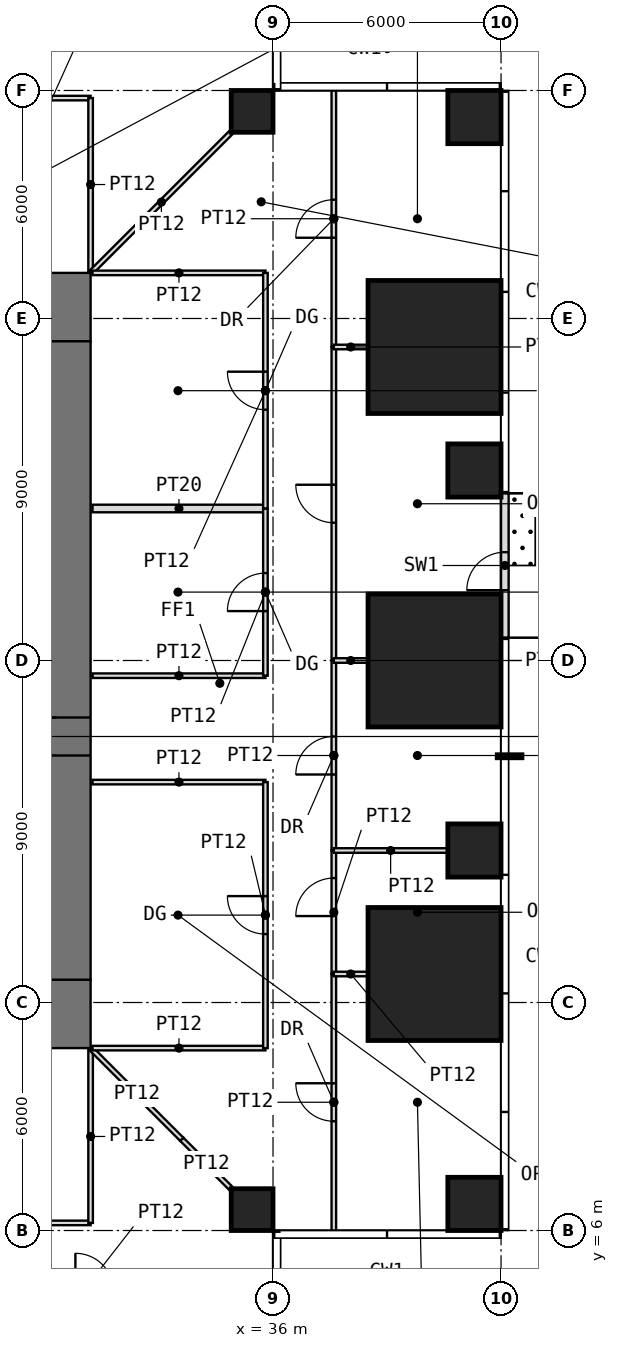
"""IFC4 building model, lengths in metres.
Left out: names, types, materials, properties, quantities, classifications, styles, units other than length and angle.
Written with IfcOpenShell. Run it as: python <this file> out.ifc"""

import sys

from ifc_helpers import new_model, si_unit, direction, frame, frame_2d, origin, origin_2d, place, context, subcontext, project, spatial, rectangle, extrude, element, fill, save


model = new_model("IFC4")
c1 = context("Model", 3, precision=1e-05, world=origin(), true_north=direction((0.0, 1.0)))
c2 = subcontext(c1, "Body", "Model", "MODEL_VIEW")
j1 = project(units=[si_unit("LENGTHUNIT", "METRE"), si_unit("PLANEANGLEUNIT", "RADIAN")], contexts=[c1])
p1 = place(None, origin())
s1 = spatial("IfcSite", under=j1, at=p1, CompositionType="ELEMENT")
p2 = place(p1, origin())
s2 = spatial("IfcBuilding", under=s1, at=p2, CompositionType="ELEMENT")
p3 = place(p2, frame((0.0, 0.0, 78.5)))
s3 = spatial("IfcBuildingStorey", under=s2, at=p3, CompositionType="ELEMENT", Elevation=78.5)
p4 = place(p3, frame((35.45, 6.55, 0.0), z_axis=(0.0, 0.0, 1.0), x_axis=(1.0, 0.0, 0.0)))
e1 = element("IfcColumn", 1, at=p4, inside=s3, PredefinedType="COLUMN", context=c2, shape_type="SweptSolid", body=[
    extrude(rectangle(XDim=1.1, YDim=1.1, at=origin_2d()), origin(), (0.0, 0.0, 1.0), 4.0),
])
p5 = place(p3, frame((41.3, 6.7, 0.0), z_axis=(0.0, 0.0, 1.0), x_axis=(1.0, 0.0, 0.0)))
e2 = element("IfcColumn", 2, at=p5, inside=s3, PredefinedType="COLUMN", context=c2, shape_type="SweptSolid", body=[
    extrude(rectangle(XDim=1.4, YDim=1.4, at=origin_2d()), origin(), (0.0, 0.0, 1.0), 4.0),
])
p6 = place(p3, frame((40.25, 12.75, 0.0), z_axis=(0.0, 0.0, 1.0), x_axis=(1.0, 0.0, 0.0)))
e3 = element("IfcColumn", 3, at=p6, inside=s3, PredefinedType="COLUMN", context=c2, shape_type="SweptSolid", body=[
    extrude(rectangle(XDim=3.5, YDim=3.5, at=origin_2d()), origin(), (0.0, 0.0, 1.0), 4.0),
])
p7 = place(p3, frame((41.3, 16.0, 0.0), z_axis=(0.0, 0.0, 1.0), x_axis=(1.0, 0.0, 0.0)))
e4 = element("IfcColumn", 4, at=p7, inside=s3, PredefinedType="COLUMN", context=c2, shape_type="SweptSolid", body=[
    extrude(rectangle(XDim=1.4, YDim=1.4, at=origin_2d()), origin(), (0.0, 0.0, 1.0), 4.0),
])
p8 = place(p3, frame((40.25, 21.0, 0.0), z_axis=(0.0, 0.0, 1.0), x_axis=(1.0, 0.0, 0.0)))
e5 = element("IfcColumn", 5, at=p8, inside=s3, PredefinedType="COLUMN", context=c2, shape_type="SweptSolid", body=[
    extrude(rectangle(XDim=3.5, YDim=3.5, at=origin_2d()), origin(), (0.0, 0.0, 1.0), 4.0),
])
p9 = place(p3, frame((41.3, 26.0, 0.0), z_axis=(0.0, 0.0, 1.0), x_axis=(1.0, 0.0, 0.0)))
e6 = element("IfcColumn", 6, at=p9, inside=s3, PredefinedType="COLUMN", context=c2, shape_type="SweptSolid", body=[
    extrude(rectangle(XDim=1.4, YDim=1.4, at=origin_2d()), origin(), (0.0, 0.0, 1.0), 4.0),
])
p10 = place(p3, frame((40.25, 29.25, 0.0), z_axis=(0.0, 0.0, 1.0), x_axis=(1.0, 0.0, 0.0)))
e7 = element("IfcColumn", 7, at=p10, inside=s3, PredefinedType="COLUMN", context=c2, shape_type="SweptSolid", body=[
    extrude(rectangle(XDim=3.5, YDim=3.5, at=origin_2d()), origin(), (0.0, 0.0, 1.0), 4.0),
])
p11 = place(p3, frame((35.45, 35.45, 0.0), z_axis=(0.0, 0.0, 1.0), x_axis=(1.0, 0.0, 0.0)))
e8 = element("IfcColumn", 8, at=p11, inside=s3, PredefinedType="COLUMN", context=c2, shape_type="SweptSolid", body=[
    extrude(rectangle(XDim=1.1, YDim=1.1, at=origin_2d()), origin(), (0.0, 0.0, 1.0), 4.0),
])
p12 = place(p3, frame((41.3, 35.3, 0.0), z_axis=(0.0, 0.0, 1.0), x_axis=(1.0, 0.0, 0.0)))
e9 = element("IfcColumn", 9, at=p12, inside=s3, PredefinedType="COLUMN", context=c2, shape_type="SweptSolid", body=[
    extrude(rectangle(XDim=1.4, YDim=1.4, at=origin_2d()), origin(), (0.0, 0.0, 1.0), 4.0),
])
p13 = place(p3, frame((42.1, 21.6, 0.0), z_axis=(0.0, 0.0, 1.0), x_axis=(0.0, 1.0, 0.0)))
e10 = element("IfcWall", 10, at=p13, inside=s3, PredefinedType="USERDEFINED", context=c2, shape_type="SweptSolid", body=[
    extrude(rectangle(XDim=3.8, YDim=0.2, at=frame_2d((1.9, 0.0))), origin(), (0.0, 0.0, 1.0), 3.75),
])
p14 = place(p13, frame((1.25, 0.0, 0.0)))
e11 = element("IfcOpeningElement", 11, at=p14, cuts=e10, PredefinedType="OPENING", context=c2, shape_type="SweptSolid", body=[
    extrude(rectangle(XDim=1.0, YDim=2.4, at=frame_2d((0.5, 1.2))), frame((0.0, 0.11, 0.0), z_axis=(0.0, -1.0, 0.0), x_axis=(1.0, 0.0, 0.0)), (0.0, 0.0, 1.0), 0.22),
])
p15 = place(p3, frame((10.8, 11.7, -0.05), z_axis=(0.0, 0.0, 1.0), x_axis=(1.0, 0.0, 0.0)))
e12 = element("IfcWall", 12, at=p15, inside=s3, PredefinedType="SHEAR", context=c2, shape_type="SweptSolid", body=[
    extrude(rectangle(XDim=20.4, YDim=1.8, at=frame_2d((10.2, 0.0))), origin(), (0.0, 0.0, 1.0), 4.0),
])
p16 = place(p15, frame((9.2, 0.0, 0.05)))
e13 = element("IfcOpeningElement", 13, at=p16, cuts=e12, PredefinedType="OPENING", context=c2, shape_type="SweptSolid", body=[
    extrude(rectangle(XDim=2.0, YDim=2.2, at=frame_2d((1.0, 1.1))), frame((0.0, 0.91, 0.0), z_axis=(0.0, -1.0, 0.0), x_axis=(1.0, 0.0, 0.0)), (0.0, 0.0, 1.0), 1.82),
])
p17 = place(p3, frame((10.8, 30.3, -0.05), z_axis=(0.0, 0.0, 1.0), x_axis=(1.0, 0.0, 0.0)))
e14 = element("IfcWall", 14, at=p17, inside=s3, PredefinedType="SHEAR", context=c2, shape_type="SweptSolid", body=[
    extrude(rectangle(XDim=20.4, YDim=1.8, at=frame_2d((10.2, 0.0))), origin(), (0.0, 0.0, 1.0), 4.0),
])
p18 = place(p17, frame((9.2, 0.0, 0.05)))
e15 = element("IfcOpeningElement", 15, at=p18, cuts=e14, PredefinedType="OPENING", context=c2, shape_type="SweptSolid", body=[
    extrude(rectangle(XDim=2.0, YDim=2.2, at=frame_2d((1.0, 1.1))), frame((0.0, 0.91, 0.0), z_axis=(0.0, -1.0, 0.0), x_axis=(1.0, 0.0, 0.0)), (0.0, 0.0, 1.0), 1.82),
])
p19 = place(p3, frame((30.3, 12.6, -0.05), z_axis=(0.0, 0.0, 1.0), x_axis=(0.0, 1.0, 0.0)))
e16 = element("IfcWall", 16, at=p19, inside=s3, PredefinedType="SHEAR", context=c2, shape_type="SweptSolid", body=[
    extrude(rectangle(XDim=16.8, YDim=1.8, at=frame_2d((8.4, 0.0))), origin(), (0.0, 0.0, 1.0), 4.0),
])
p20 = place(p19, frame((5.9, 0.0, 0.05)))
e17 = element("IfcOpeningElement", 17, at=p20, cuts=e16, PredefinedType="OPENING", context=c2, shape_type="SweptSolid", body=[
    extrude(rectangle(XDim=1.0, YDim=2.2, at=frame_2d((0.5, 1.1))), frame((0.0, 0.91, 0.0), z_axis=(0.0, -1.0, 0.0), x_axis=(1.0, 0.0, 0.0)), (0.0, 0.0, 1.0), 1.82),
])
p21 = place(p3, frame((18.6, 6.2, 0.0), z_axis=(0.0, 0.0, 1.0), x_axis=(1.0, 0.0, 0.0)))
e18 = element("IfcWall", 18, at=p21, inside=s3, PredefinedType="PARTITIONING", context=c2, shape_type="SweptSolid", body=[
    extrude(rectangle(XDim=12.6, YDim=0.12, at=frame_2d((6.3, 0.0))), origin(), (0.0, 0.0, 1.0), 3.75),
])
p22 = place(p21, frame((8.1, 0.0, 0.0)))
e19 = element("IfcOpeningElement", 19, at=p22, cuts=e18, PredefinedType="OPENING", context=c2, shape_type="SweptSolid", body=[
    extrude(rectangle(XDim=1.0, YDim=2.4, at=frame_2d((0.5, 1.2))), frame((0.0, 0.07, 0.0), z_axis=(0.0, -1.0, 0.0), x_axis=(1.0, 0.0, 0.0)), (0.0, 0.0, 1.0), 0.14),
])
p23 = place(p3, frame((27.4, 35.8, 0.0), z_axis=(0.0, 0.0, 1.0), x_axis=(1.0, 0.0, 0.0)))
e20 = element("IfcWall", 20, at=p23, inside=s3, PredefinedType="PARTITIONING", context=c2, shape_type="SweptSolid", body=[
    extrude(rectangle(XDim=3.8, YDim=0.12, at=frame_2d((1.9, 0.0))), origin(), (0.0, 0.0, 1.0), 3.75),
])
p24 = place(p23, frame((1.4, 0.0, 0.0)))
e21 = element("IfcOpeningElement", 21, at=p24, cuts=e20, PredefinedType="OPENING", context=c2, shape_type="SweptSolid", body=[
    extrude(rectangle(XDim=1.0, YDim=2.4, at=frame_2d((0.5, 1.2))), frame((0.0, 0.07, 0.0), z_axis=(0.0, -1.0, 0.0), x_axis=(1.0, 0.0, 0.0)), (0.0, 0.0, 1.0), 0.14),
])
for number, where, z_axis, x_axis in (
    (22, (31.2, 6.2, 0.0), (0.0, 0.0, 1.0), (0.0, 1.0, 0.0)),
    (23, (31.2, 31.25, 0.0), (0.0, 0.0, 1.0), (0.0, 1.0, 0.0)),
):
    element("IfcWall", number, at=place(p3, frame(where, z_axis=z_axis, x_axis=x_axis)), inside=s3, PredefinedType="PARTITIONING", context=c2, shape_type="SweptSolid", body=[
        extrude(rectangle(XDim=4.55, YDim=0.12, at=frame_2d((2.275, 0.0))), origin(), (0.0, 0.0, 1.0), 3.75),
    ])
p25 = place(p3, frame((31.235, 10.765, 0.0), z_axis=(0.0, 0.0, 1.0), x_axis=(0.707106781187, -0.707106781187, 0.0)))
e24 = element("IfcWall", 24, at=p25, inside=s3, PredefinedType="PARTITIONING", context=c2, shape_type="SweptSolid", body=[
    extrude(rectangle(XDim=3.346, YDim=0.12, at=frame_2d((1.673, 0.0))), origin(), (0.0, 0.0, 1.0), 3.75),
])
p26 = place(p3, frame((31.235, 31.235, 0.0), z_axis=(0.0, 0.0, 1.0), x_axis=(0.707106781187, 0.707106781187, 0.0)))
e25 = element("IfcWall", 25, at=p26, inside=s3, PredefinedType="PARTITIONING", context=c2, shape_type="SweptSolid", body=[
    extrude(rectangle(XDim=5.168, YDim=0.12, at=frame_2d((2.584, 0.0))), origin(), (0.0, 0.0, 1.0), 3.75),
])
for number, where, z_axis, x_axis in (
    (26, (31.25, 10.8, 0.0), (0.0, 0.0, 1.0), (1.0, 0.0, 0.0)),
    (27, (31.25, 17.8, 0.0), (0.0, 0.0, 1.0), (1.0, 0.0, 0.0)),
    (28, (31.25, 20.6, 0.0), (0.0, 0.0, 1.0), (1.0, 0.0, 0.0)),
):
    element("IfcWall", number, at=place(p3, frame(where, z_axis=z_axis, x_axis=x_axis)), inside=s3, PredefinedType="PARTITIONING", context=c2, shape_type="SweptSolid", body=[
        extrude(rectangle(XDim=4.55, YDim=0.12, at=frame_2d((2.275, 0.0))), origin(), (0.0, 0.0, 1.0), 3.75),
    ])
p27 = place(p3, frame((31.25, 25.0, 0.0), z_axis=(0.0, 0.0, 1.0), x_axis=(1.0, 0.0, 0.0)))
e29 = element("IfcWall", 29, at=p27, inside=s3, PredefinedType="PARTITIONING", context=c2, shape_type="SweptSolid", body=[
    extrude(rectangle(XDim=4.55, YDim=0.2, at=frame_2d((2.275, 0.0))), origin(), (0.0, 0.0, 1.0), 3.75),
])
p28 = place(p3, frame((31.25, 31.2, 0.0), z_axis=(0.0, 0.0, 1.0), x_axis=(1.0, 0.0, 0.0)))
e30 = element("IfcWall", 30, at=p28, inside=s3, PredefinedType="PARTITIONING", context=c2, shape_type="SweptSolid", body=[
    extrude(rectangle(XDim=4.55, YDim=0.12, at=frame_2d((2.275, 0.0))), origin(), (0.0, 0.0, 1.0), 3.75),
])
p29 = place(p3, frame((33.602, 8.398, 0.0), z_axis=(0.0, 0.0, 1.0), x_axis=(0.707106781187, -0.707106781187, 0.0)))
e31 = element("IfcWall", 31, at=p29, inside=s3, PredefinedType="PARTITIONING", context=c2, shape_type="SweptSolid", body=[
    extrude(rectangle(XDim=1.822, YDim=0.12, at=frame_2d((0.911, 0.0))), origin(), (0.0, 0.0, 1.0), 3.75),
])
p30 = place(p3, frame((35.8, 10.8, 0.0), z_axis=(0.0, 0.0, 1.0), x_axis=(0.0, 1.0, 0.0)))
e32 = element("IfcWall", 32, at=p30, inside=s3, PredefinedType="PARTITIONING", context=c2, shape_type="SweptSolid", body=[
    extrude(rectangle(XDim=7.0, YDim=0.12, at=frame_2d((3.5, 0.0))), origin(), (0.0, 0.0, 1.0), 3.75),
])
p31 = place(p30, frame((3.0, 0.0, 0.0)))
e33 = element("IfcOpeningElement", 33, at=p31, cuts=e32, PredefinedType="OPENING", context=c2, shape_type="SweptSolid", body=[
    extrude(rectangle(XDim=1.0, YDim=2.4, at=frame_2d((0.5, 1.2))), frame((0.0, 0.07, 0.0), z_axis=(0.0, -1.0, 0.0), x_axis=(1.0, 0.0, 0.0)), (0.0, 0.0, 1.0), 0.14),
])
p32 = place(p3, frame((35.8, 20.6, 0.0), z_axis=(0.0, 0.0, 1.0), x_axis=(0.0, 1.0, 0.0)))
e34 = element("IfcWall", 34, at=p32, inside=s3, PredefinedType="PARTITIONING", context=c2, shape_type="SweptSolid", body=[
    extrude(rectangle(XDim=4.4, YDim=0.12, at=frame_2d((2.2, 0.0))), origin(), (0.0, 0.0, 1.0), 3.75),
])
p33 = place(p32, frame((1.7, 0.0, 0.0)))
e35 = element("IfcOpeningElement", 35, at=p33, cuts=e34, PredefinedType="OPENING", context=c2, shape_type="SweptSolid", body=[
    extrude(rectangle(XDim=1.0, YDim=2.4, at=frame_2d((0.5, 1.2))), frame((0.0, 0.07, 0.0), z_axis=(0.0, -1.0, 0.0), x_axis=(1.0, 0.0, 0.0)), (0.0, 0.0, 1.0), 0.14),
])
p34 = place(p3, frame((35.8, 25.0, 0.0), z_axis=(0.0, 0.0, 1.0), x_axis=(0.0, 1.0, 0.0)))
e36 = element("IfcWall", 36, at=p34, inside=s3, PredefinedType="PARTITIONING", context=c2, shape_type="SweptSolid", body=[
    extrude(rectangle(XDim=6.2, YDim=0.12, at=frame_2d((3.1, 0.0))), origin(), (0.0, 0.0, 1.0), 3.75),
])
p35 = place(p34, frame((2.6, 0.0, 0.0)))
e37 = element("IfcOpeningElement", 37, at=p35, cuts=e36, PredefinedType="OPENING", context=c2, shape_type="SweptSolid", body=[
    extrude(rectangle(XDim=1.0, YDim=2.4, at=frame_2d((0.5, 1.2))), frame((0.0, 0.07, 0.0), z_axis=(0.0, -1.0, 0.0), x_axis=(1.0, 0.0, 0.0)), (0.0, 0.0, 1.0), 0.14),
])
p36 = place(p3, frame((37.6, 6.0, 0.0), z_axis=(0.0, 0.0, 1.0), x_axis=(0.0, 1.0, 0.0)))
e38 = element("IfcWall", 38, at=p36, inside=s3, PredefinedType="PARTITIONING", context=c2, shape_type="SweptSolid", body=[
    extrude(rectangle(XDim=6.75, YDim=0.12, at=frame_2d((3.375, 0.0))), origin(), (0.0, 0.0, 1.0), 3.75),
])
p37 = place(p36, frame((2.875, 0.0, 0.0)))
e39 = element("IfcOpeningElement", 39, at=p37, cuts=e38, PredefinedType="OPENING", context=c2, shape_type="SweptSolid", body=[
    extrude(rectangle(XDim=1.0, YDim=2.2, at=frame_2d((0.5, 1.1))), frame((0.0, 0.07, 0.0), z_axis=(0.0, -1.0, 0.0), x_axis=(1.0, 0.0, 0.0)), (0.0, 0.0, 1.0), 0.14),
])
p38 = place(p3, frame((37.6, 12.75, 0.0), z_axis=(0.0, 0.0, 1.0), x_axis=(0.0, 1.0, 0.0)))
e40 = element("IfcWall", 40, at=p38, inside=s3, PredefinedType="PARTITIONING", context=c2, shape_type="SweptSolid", body=[
    extrude(rectangle(XDim=3.25, YDim=0.12, at=frame_2d((1.625, 0.0))), origin(), (0.0, 0.0, 1.0), 3.75),
])
p39 = place(p38, frame((1.525, 0.0, 0.0)))
e41 = element("IfcOpeningElement", 41, at=p39, cuts=e40, PredefinedType="OPENING", context=c2, shape_type="SweptSolid", body=[
    extrude(rectangle(XDim=1.0, YDim=2.4, at=frame_2d((0.5, 1.2))), frame((0.0, 0.07, 0.0), z_axis=(0.0, -1.0, 0.0), x_axis=(1.0, 0.0, 0.0)), (0.0, 0.0, 1.0), 0.14),
])
p40 = place(p3, frame((37.6, 12.75, 0.0), z_axis=(0.0, 0.0, 1.0), x_axis=(1.0, 0.0, 0.0)))
e42 = element("IfcWall", 42, at=p40, inside=s3, PredefinedType="PARTITIONING", context=c2, shape_type="SweptSolid", body=[
    extrude(rectangle(XDim=0.89, YDim=0.12, at=frame_2d((0.445, 0.0))), origin(), (0.0, 0.0, 1.0), 3.75),
])
p41 = place(p3, frame((37.6, 16.0, 0.0), z_axis=(0.0, 0.0, 1.0), x_axis=(0.0, 1.0, 0.0)))
e43 = element("IfcWall", 43, at=p41, inside=s3, PredefinedType="PARTITIONING", context=c2, shape_type="SweptSolid", body=[
    extrude(rectangle(XDim=5.0, YDim=0.12, at=frame_2d((2.5, 0.0))), origin(), (0.0, 0.0, 1.0), 3.75),
])
p42 = place(p41, frame((2.0, 0.0, 0.0)))
e44 = element("IfcOpeningElement", 44, at=p42, cuts=e43, PredefinedType="OPENING", context=c2, shape_type="SweptSolid", body=[
    extrude(rectangle(XDim=1.0, YDim=2.2, at=frame_2d((0.5, 1.1))), frame((0.0, 0.07, 0.0), z_axis=(0.0, -1.0, 0.0), x_axis=(1.0, 0.0, 0.0)), (0.0, 0.0, 1.0), 0.14),
])
p43 = place(p3, frame((37.6, 16.0, 0.0), z_axis=(0.0, 0.0, 1.0), x_axis=(1.0, 0.0, 0.0)))
e45 = element("IfcWall", 45, at=p43, inside=s3, PredefinedType="PARTITIONING", context=c2, shape_type="SweptSolid", body=[
    extrude(rectangle(XDim=2.99, YDim=0.12, at=frame_2d((1.495, 0.0))), origin(), (0.0, 0.0, 1.0), 3.75),
])
p44 = place(p3, frame((37.6, 21.0, 0.0), z_axis=(0.0, 0.0, 1.0), x_axis=(0.0, 1.0, 0.0)))
e46 = element("IfcWall", 46, at=p44, inside=s3, PredefinedType="PARTITIONING", context=c2, shape_type="SweptSolid", body=[
    extrude(rectangle(XDim=8.25, YDim=0.12, at=frame_2d((4.125, 0.0))), origin(), (0.0, 0.0, 1.0), 3.75),
])
p45 = place(p44, frame((3.625, 0.0, 0.0)))
e47 = element("IfcOpeningElement", 47, at=p45, cuts=e46, PredefinedType="OPENING", context=c2, shape_type="SweptSolid", body=[
    extrude(rectangle(XDim=1.0, YDim=2.4, at=frame_2d((0.5, 1.2))), frame((0.0, 0.07, 0.0), z_axis=(0.0, -1.0, 0.0), x_axis=(1.0, 0.0, 0.0)), (0.0, 0.0, 1.0), 0.14),
])
p46 = place(p3, frame((37.6, 21.0, 0.0), z_axis=(0.0, 0.0, 1.0), x_axis=(1.0, 0.0, 0.0)))
e48 = element("IfcWall", 48, at=p46, inside=s3, PredefinedType="PARTITIONING", context=c2, shape_type="SweptSolid", body=[
    extrude(rectangle(XDim=0.89, YDim=0.12, at=frame_2d((0.445, 0.0))), origin(), (0.0, 0.0, 1.0), 3.75),
])
p47 = place(p3, frame((37.6, 29.25, 0.0), z_axis=(0.0, 0.0, 1.0), x_axis=(0.0, 1.0, 0.0)))
e49 = element("IfcWall", 49, at=p47, inside=s3, PredefinedType="PARTITIONING", context=c2, shape_type="SweptSolid", body=[
    extrude(rectangle(XDim=6.75, YDim=0.12, at=frame_2d((3.375, 0.0))), origin(), (0.0, 0.0, 1.0), 3.75),
])
p48 = place(p47, frame((2.875, 0.0, 0.0)))
e50 = element("IfcOpeningElement", 50, at=p48, cuts=e49, PredefinedType="OPENING", context=c2, shape_type="SweptSolid", body=[
    extrude(rectangle(XDim=1.0, YDim=2.2, at=frame_2d((0.5, 1.1))), frame((0.0, 0.07, 0.0), z_axis=(0.0, -1.0, 0.0), x_axis=(1.0, 0.0, 0.0)), (0.0, 0.0, 1.0), 0.14),
])
p49 = place(p3, frame((37.6, 29.25, 0.0), z_axis=(0.0, 0.0, 1.0), x_axis=(1.0, 0.0, 0.0)))
e51 = element("IfcWall", 51, at=p49, inside=s3, PredefinedType="PARTITIONING", context=c2, shape_type="SweptSolid", body=[
    extrude(rectangle(XDim=0.89, YDim=0.12, at=frame_2d((0.445, 0.0))), origin(), (0.0, 0.0, 1.0), 3.75),
])
p50 = place(p14, origin())
e52 = element("IfcDoor", 52, at=p50, inside=s3, OperationType="SINGLE_SWING_LEFT", PredefinedType="DOOR", context=c2, shape_type="SweptSolid", body=[
    extrude(rectangle(XDim=1.0, YDim=2.4, at=frame_2d((0.5, 1.2))), frame((0.0, 0.025, 0.0), z_axis=(0.0, -1.0, 0.0), x_axis=(1.0, 0.0, 0.0)), (0.0, 0.0, 1.0), 0.05),
])
fill(e11, e52)
p51 = place(p20, origin())
e53 = element("IfcDoor", 53, at=p51, inside=s3, OperationType="SINGLE_SWING_RIGHT", PredefinedType="DOOR", context=c2, shape_type="SweptSolid", body=[
    extrude(rectangle(XDim=1.0, YDim=2.2, at=frame_2d((0.5, 1.1))), frame((0.0, 0.025, 0.0), z_axis=(0.0, -1.0, 0.0), x_axis=(1.0, 0.0, 0.0)), (0.0, 0.0, 1.0), 0.05),
])
fill(e17, e53)
p52 = place(p33, origin())
e54 = element("IfcDoor", 54, at=p52, inside=s3, OperationType="SINGLE_SWING_LEFT", PredefinedType="DOOR", context=c2, shape_type="SweptSolid", body=[
    extrude(rectangle(XDim=1.0, YDim=2.4, at=frame_2d((0.5, 1.2))), frame((0.0, 0.025, 0.0), z_axis=(0.0, -1.0, 0.0), x_axis=(1.0, 0.0, 0.0)), (0.0, 0.0, 1.0), 0.05),
])
fill(e35, e54)
p53 = place(p35, origin())
e55 = element("IfcDoor", 55, at=p53, inside=s3, OperationType="SINGLE_SWING_RIGHT", PredefinedType="DOOR", context=c2, shape_type="SweptSolid", body=[
    extrude(rectangle(XDim=1.0, YDim=2.4, at=frame_2d((0.5, 1.2))), frame((0.0, 0.025, 0.0), z_axis=(0.0, -1.0, 0.0), x_axis=(1.0, 0.0, 0.0)), (0.0, 0.0, 1.0), 0.05),
])
fill(e37, e55)
p54 = place(p37, origin())
e56 = element("IfcDoor", 56, at=p54, inside=s3, OperationType="SINGLE_SWING_RIGHT", PredefinedType="DOOR", context=c2, shape_type="SweptSolid", body=[
    extrude(rectangle(XDim=1.0, YDim=2.2, at=frame_2d((0.5, 1.1))), frame((0.0, 0.025, 0.0), z_axis=(0.0, -1.0, 0.0), x_axis=(1.0, 0.0, 0.0)), (0.0, 0.0, 1.0), 0.05),
])
fill(e39, e56)
p55 = place(p42, origin())
e57 = element("IfcDoor", 57, at=p55, inside=s3, OperationType="SINGLE_SWING_LEFT", PredefinedType="DOOR", context=c2, shape_type="SweptSolid", body=[
    extrude(rectangle(XDim=1.0, YDim=2.2, at=frame_2d((0.5, 1.1))), frame((0.0, 0.025, 0.0), z_axis=(0.0, -1.0, 0.0), x_axis=(1.0, 0.0, 0.0)), (0.0, 0.0, 1.0), 0.05),
])
fill(e44, e57)
p56 = place(p48, origin())
e58 = element("IfcDoor", 58, at=p56, inside=s3, OperationType="SINGLE_SWING_LEFT", PredefinedType="DOOR", context=c2, shape_type="SweptSolid", body=[
    extrude(rectangle(XDim=1.0, YDim=2.2, at=frame_2d((0.5, 1.1))), frame((0.0, 0.025, 0.0), z_axis=(0.0, -1.0, 0.0), x_axis=(1.0, 0.0, 0.0)), (0.0, 0.0, 1.0), 0.05),
])
fill(e50, e58)
p57 = place(p45, origin())
e59 = element("IfcDoor", 59, at=p57, inside=s3, OperationType="SINGLE_SWING_RIGHT", PredefinedType="DOOR", context=c2, shape_type="SweptSolid", body=[
    extrude(rectangle(XDim=1.0, YDim=2.4, at=frame_2d((0.5, 1.2))), frame((0.0, 0.025, 0.0), z_axis=(0.0, -1.0, 0.0), x_axis=(1.0, 0.0, 0.0)), (0.0, 0.0, 1.0), 0.05),
])
fill(e47, e59)
p58 = place(p39, origin())
e60 = element("IfcDoor", 60, at=p58, inside=s3, OperationType="SINGLE_SWING_LEFT", PredefinedType="DOOR", context=c2, shape_type="SweptSolid", body=[
    extrude(rectangle(XDim=1.0, YDim=2.4, at=frame_2d((0.5, 1.2))), frame((0.0, 0.025, 0.0), z_axis=(0.0, -1.0, 0.0), x_axis=(1.0, 0.0, 0.0)), (0.0, 0.0, 1.0), 0.05),
])
fill(e41, e60)
p59 = place(p31, origin())
e61 = element("IfcDoor", 61, at=p59, inside=s3, OperationType="SINGLE_SWING_RIGHT", PredefinedType="DOOR", context=c2, shape_type="SweptSolid", body=[
    extrude(rectangle(XDim=1.0, YDim=2.4, at=frame_2d((0.5, 1.2))), frame((0.0, 0.025, 0.0), z_axis=(0.0, -1.0, 0.0), x_axis=(1.0, 0.0, 0.0)), (0.0, 0.0, 1.0), 0.05),
])
fill(e33, e61)
save(model, sys.argv[1])
